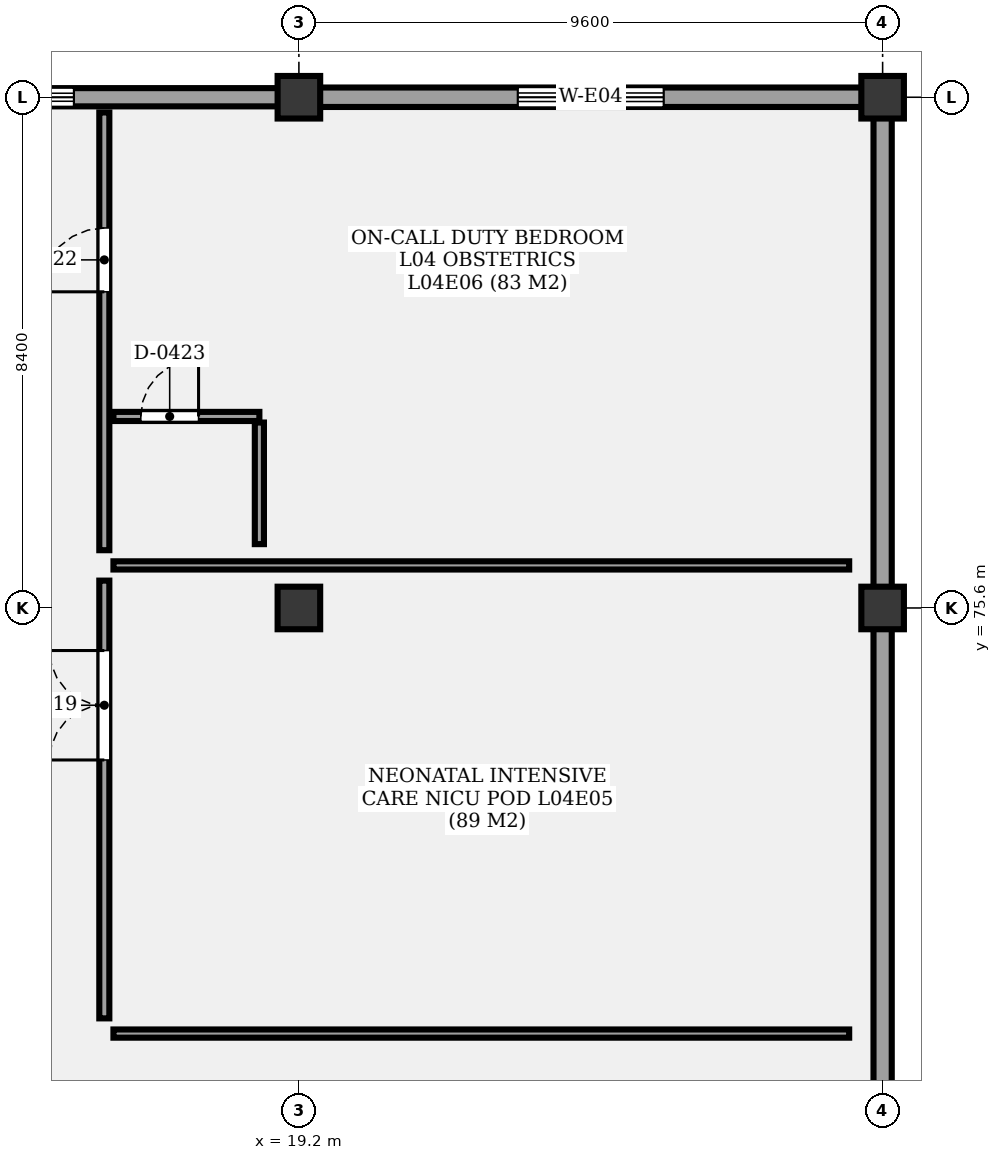
"""IFC4 building model, lengths in metres.
Left out: names, types, materials, properties, quantities, classifications, styles, units other than length and angle.
Written with IfcOpenShell. Run it as: python <this file> out.ifc"""

import sys

from ifc_helpers import new_model, si_unit, direction, frame, frame_2d, origin, origin_2d, place, context, subcontext, project, spatial, rectangle, extrude, element, fill, save


model = new_model("IFC4")
c1 = context("Model", 3, precision=1e-05, world=origin(), true_north=direction((0.0, 1.0)))
c2 = subcontext(c1, "Body", "Model", "MODEL_VIEW")
j1 = project(units=[si_unit("LENGTHUNIT", "METRE"), si_unit("PLANEANGLEUNIT", "RADIAN")], contexts=[c1])
p1 = place(None, origin())
s1 = spatial("IfcSite", under=j1, at=p1, CompositionType="ELEMENT")
p2 = place(p1, origin())
s2 = spatial("IfcBuilding", under=s1, at=p2, CompositionType="ELEMENT")
p3 = place(p2, frame((0.0, 0.0, 17.8)))
s3 = spatial("IfcBuildingStorey", under=s2, at=p3, CompositionType="ELEMENT", Elevation=17.8)
for number, where, z_axis, x_axis in (
    (1, (19.2, 75.6, 0.0), (0.0, 0.0, 1.0), (1.0, 0.0, 0.0)),
    (2, (19.2, 84.0, 0.0), (0.0, 0.0, 1.0), (1.0, 0.0, 0.0)),
    (3, (28.8, 75.6, 0.0), (0.0, 0.0, 1.0), (1.0, 0.0, 0.0)),
    (4, (28.8, 84.0, 0.0), (0.0, 0.0, 1.0), (1.0, 0.0, 0.0)),
):
    element("IfcColumn", number, at=place(p3, frame(where, z_axis=z_axis, x_axis=x_axis)), inside=s3, PredefinedType="COLUMN", context=c2, shape_type="SweptSolid", body=[
        extrude(rectangle(XDim=0.7, YDim=0.7, at=origin_2d()), origin(), (0.0, 0.0, 1.0), 4.2),
    ])
p4 = place(p3, frame((9.6, 84.0, 0.0), z_axis=(0.0, 0.0, 1.0), x_axis=(1.0, 0.0, 0.0)))
e5 = element("IfcWall", 5, at=p4, inside=s3, PredefinedType="SOLIDWALL", context=c2, shape_type="SweptSolid", body=[
    extrude(rectangle(XDim=9.6, YDim=0.3, at=frame_2d((4.8, 0.0))), origin(), (0.0, 0.0, 1.0), 3.39),
])
p5 = place(p4, frame((3.7, 0.0, 0.85)))
e6 = element("IfcOpeningElement", 6, at=p5, cuts=e5, PredefinedType="OPENING", context=c2, shape_type="SweptSolid", body=[
    extrude(rectangle(XDim=2.2, YDim=1.2, at=frame_2d((1.1, 0.6))), frame((0.0, 0.16, 0.0), z_axis=(0.0, -1.0, 0.0), x_axis=(1.0, 0.0, 0.0)), (0.0, 0.0, 1.0), 0.32),
])
p6 = place(p3, frame((19.2, 84.0, 0.0), z_axis=(0.0, 0.0, 1.0), x_axis=(1.0, 0.0, 0.0)))
e7 = element("IfcWall", 7, at=p6, inside=s3, PredefinedType="SOLIDWALL", context=c2, shape_type="SweptSolid", body=[
    extrude(rectangle(XDim=9.6, YDim=0.32, at=frame_2d((4.8, 0.0))), origin(), (0.0, 0.0, 1.0), 3.39),
])
p7 = place(p6, frame((3.6, 0.0, 0.85)))
e8 = element("IfcOpeningElement", 8, at=p7, cuts=e7, PredefinedType="OPENING", context=c2, shape_type="SweptSolid", body=[
    extrude(rectangle(XDim=2.4, YDim=1.2, at=frame_2d((1.2, 0.6))), frame((0.0, 0.17, 0.0), z_axis=(0.0, -1.0, 0.0), x_axis=(1.0, 0.0, 0.0)), (0.0, 0.0, 1.0), 0.34),
])
p8 = place(p3, frame((28.8, 83.84, 0.0), z_axis=(0.0, 0.0, 1.0), x_axis=(0.0, -1.0, 0.0)))
e9 = element("IfcWall", 9, at=p8, inside=s3, PredefinedType="SOLIDWALL", context=c2, shape_type="SweptSolid", body=[
    extrude(rectangle(XDim=16.64, YDim=0.3, at=frame_2d((8.32, 0.0))), origin(), (0.0, 0.0, 1.0), 3.39),
])
p9 = place(p3, frame((16.0, 68.85, 0.0), z_axis=(0.0, 0.0, 1.0), x_axis=(0.0, 1.0, 0.0)))
e10 = element("IfcWall", 10, at=p9, inside=s3, PredefinedType="PARTITIONING", context=c2, shape_type="SweptSolid", body=[
    extrude(rectangle(XDim=7.2, YDim=0.165, at=frame_2d((3.6, 0.0))), origin(), (0.0, 0.0, 1.0), 3.3),
])
p10 = place(p9, frame((4.25, 0.0, 0.0)))
e11 = element("IfcOpeningElement", 11, at=p10, cuts=e10, PredefinedType="OPENING", context=c2, shape_type="SweptSolid", body=[
    extrude(rectangle(XDim=1.8, YDim=2.4, at=frame_2d((0.9, 1.2))), frame((0.0, 0.093, 0.0), z_axis=(0.0, -1.0, 0.0), x_axis=(1.0, 0.0, 0.0)), (0.0, 0.0, 1.0), 0.185),
])
p11 = place(p3, frame((16.15, 68.6, 0.0), z_axis=(0.0, 0.0, 1.0), x_axis=(1.0, 0.0, 0.0)))
e12 = element("IfcWall", 12, at=p11, inside=s3, PredefinedType="PARTITIONING", context=c2, shape_type="SweptSolid", body=[
    extrude(rectangle(XDim=12.1, YDim=0.135, at=frame_2d((6.05, 0.0))), origin(), (0.0, 0.0, 1.0), 3.3),
])
p12 = place(p3, frame((16.0, 76.55, 0.0), z_axis=(0.0, 0.0, 1.0), x_axis=(0.0, 1.0, 0.0)))
e13 = element("IfcWall", 13, at=p12, inside=s3, PredefinedType="PARTITIONING", context=c2, shape_type="SweptSolid", body=[
    extrude(rectangle(XDim=7.2, YDim=0.165, at=frame_2d((3.6, 0.0))), origin(), (0.0, 0.0, 1.0), 3.3),
])
p13 = place(p12, frame((4.25, 0.0, 0.0)))
e14 = element("IfcOpeningElement", 14, at=p13, cuts=e13, PredefinedType="OPENING", context=c2, shape_type="SweptSolid", body=[
    extrude(rectangle(XDim=1.05, YDim=2.2, at=frame_2d((0.525, 1.1))), frame((0.0, 0.093, 0.0), z_axis=(0.0, -1.0, 0.0), x_axis=(1.0, 0.0, 0.0)), (0.0, 0.0, 1.0), 0.185),
])
p14 = place(p3, frame((16.15, 78.75, 0.0), z_axis=(0.0, 0.0, 1.0), x_axis=(1.0, 0.0, 0.0)))
e15 = element("IfcWall", 15, at=p14, inside=s3, PredefinedType="PARTITIONING", context=c2, shape_type="SweptSolid", body=[
    extrude(rectangle(XDim=2.4, YDim=0.15, at=frame_2d((1.2, 0.0))), origin(), (0.0, 0.0, 1.0), 3.3),
])
p15 = place(p14, frame((0.45, 0.0, 0.0)))
e16 = element("IfcOpeningElement", 16, at=p15, cuts=e15, PredefinedType="OPENING", context=c2, shape_type="SweptSolid", body=[
    extrude(rectangle(XDim=0.95, YDim=2.1, at=frame_2d((0.475, 1.05))), frame((0.0, 0.085, 0.0), z_axis=(0.0, -1.0, 0.0), x_axis=(1.0, 0.0, 0.0)), (0.0, 0.0, 1.0), 0.17),
])
p16 = place(p3, frame((18.55, 76.65, 0.0), z_axis=(0.0, 0.0, 1.0), x_axis=(0.0, 1.0, 0.0)))
e17 = element("IfcWall", 17, at=p16, inside=s3, PredefinedType="PARTITIONING", context=c2, shape_type="SweptSolid", body=[
    extrude(rectangle(XDim=2.0, YDim=0.15, at=frame_2d((1.0, 0.0))), origin(), (0.0, 0.0, 1.0), 3.3),
])
p17 = place(p3, frame((16.15, 76.3, 0.0), z_axis=(0.0, 0.0, 1.0), x_axis=(1.0, 0.0, 0.0)))
e18 = element("IfcWall", 18, at=p17, inside=s3, PredefinedType="PARTITIONING", context=c2, shape_type="SweptSolid", body=[
    extrude(rectangle(XDim=12.1, YDim=0.135, at=frame_2d((6.05, 0.0))), origin(), (0.0, 0.0, 1.0), 3.3),
])
p18 = place(p5, origin())
e19 = element("IfcWindow", 19, at=p18, inside=s3, PartitioningType="SINGLE_PANEL", PredefinedType="WINDOW", context=c2, shape_type="SweptSolid", body=[
    extrude(rectangle(XDim=2.2, YDim=1.2, at=frame_2d((1.1, 0.6))), frame((0.0, 0.03, 0.0), z_axis=(0.0, -1.0, 0.0), x_axis=(1.0, 0.0, 0.0)), (0.0, 0.0, 1.0), 0.06),
])
fill(e6, e19)
p19 = place(p7, origin())
e20 = element("IfcWindow", 20, at=p19, inside=s3, PartitioningType="SINGLE_PANEL", PredefinedType="WINDOW", context=c2, shape_type="SweptSolid", body=[
    extrude(rectangle(XDim=2.4, YDim=1.2, at=frame_2d((1.2, 0.6))), frame((0.0, 0.03, 0.0), z_axis=(0.0, -1.0, 0.0), x_axis=(1.0, 0.0, 0.0)), (0.0, 0.0, 1.0), 0.06),
])
fill(e8, e20)
p20 = place(p10, origin())
e21 = element("IfcDoor", 21, at=p20, inside=s3, OperationType="DOUBLE_DOOR_SINGLE_SWING", PredefinedType="DOOR", context=c2, shape_type="SweptSolid", body=[
    extrude(rectangle(XDim=1.8, YDim=2.4, at=frame_2d((0.9, 1.2))), frame((0.0, 0.025, 0.0), z_axis=(0.0, -1.0, 0.0), x_axis=(1.0, 0.0, 0.0)), (0.0, 0.0, 1.0), 0.05),
])
fill(e11, e21)
p21 = place(p13, origin())
e22 = element("IfcDoor", 22, at=p21, inside=s3, OperationType="SINGLE_SWING_LEFT", PredefinedType="DOOR", context=c2, shape_type="SweptSolid", body=[
    extrude(rectangle(XDim=1.05, YDim=2.2, at=frame_2d((0.525, 1.1))), frame((0.0, 0.025, 0.0), z_axis=(0.0, -1.0, 0.0), x_axis=(1.0, 0.0, 0.0)), (0.0, 0.0, 1.0), 0.05),
])
fill(e14, e22)
p22 = place(p15, origin())
e23 = element("IfcDoor", 23, at=p22, inside=s3, OperationType="SINGLE_SWING_RIGHT", PredefinedType="DOOR", context=c2, shape_type="SweptSolid", body=[
    extrude(rectangle(XDim=0.95, YDim=2.1, at=frame_2d((0.475, 1.05))), frame((0.0, 0.025, 0.0), z_axis=(0.0, -1.0, 0.0), x_axis=(1.0, 0.0, 0.0)), (0.0, 0.0, 1.0), 0.05),
])
fill(e16, e23)
save(model, sys.argv[1])
